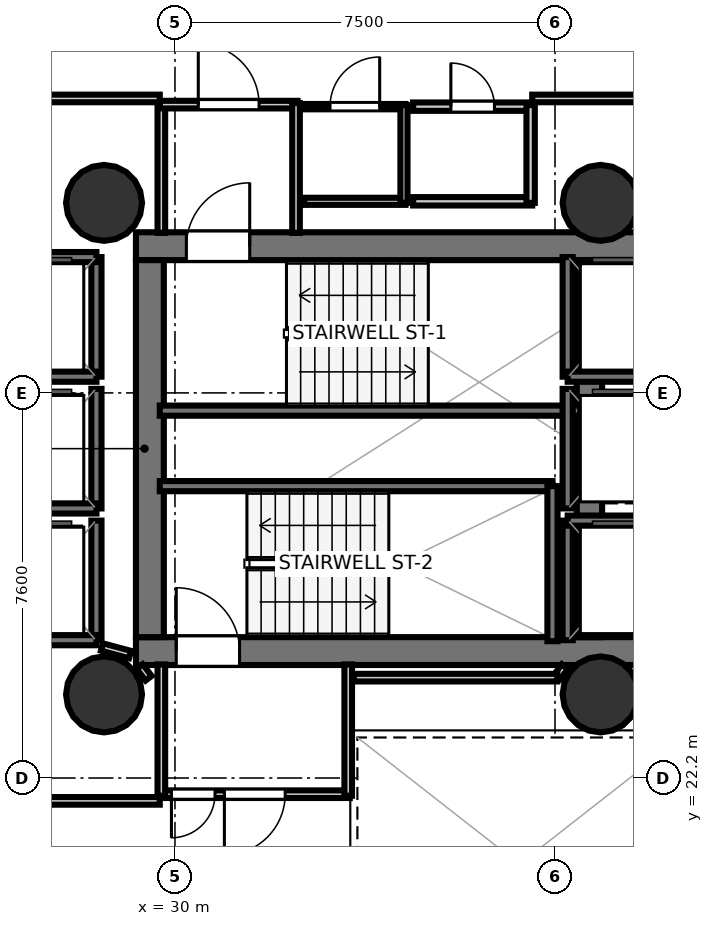
"""IFC4 building model, lengths in metres.
Left out: names, types, materials, properties, quantities, classifications, styles, units other than length and angle.
Written with IfcOpenShell. Run it as: python <this file> out.ifc"""

import sys

from ifc_helpers import new_model, si_unit, direction, frame, frame_2d, origin, origin_2d, place, context, subcontext, project, spatial, rectangle, hollow_circle, extrude, element, fill, save


model = new_model("IFC4")
c1 = context("Model", 3, precision=1e-05, world=origin(), true_north=direction((0.0, 1.0)))
c2 = subcontext(c1, "Body", "Model", "MODEL_VIEW")
j1 = project(units=[si_unit("LENGTHUNIT", "METRE"), si_unit("PLANEANGLEUNIT", "RADIAN")], contexts=[c1])
p1 = place(None, origin())
s1 = spatial("IfcSite", under=j1, at=p1, CompositionType="ELEMENT")
p2 = place(p1, origin())
s2 = spatial("IfcBuilding", under=s1, at=p2, CompositionType="ELEMENT")
p3 = place(p2, frame((0.0, 0.0, 116.3)))
s3 = spatial("IfcBuildingStorey", under=s2, at=p3, CompositionType="ELEMENT", Elevation=116.3)
p4 = place(p3, frame((29.23, 32.695, 0.0), z_axis=(0.0, 0.0, 1.0), x_axis=(1.0, 0.0, 0.0)))
e1 = element("IfcWall", 1, at=p4, inside=s3, PredefinedType="SHEAR", context=c2, shape_type="SweptSolid", body=[
    extrude(rectangle(XDim=10.62, YDim=0.55, at=frame_2d((5.31, 0.0))), origin(), (0.0, 0.0, 1.0), 3.52),
])
p5 = place(p4, frame((0.995, 0.0, 0.0)))
e2 = element("IfcOpeningElement", 2, at=p5, cuts=e1, PredefinedType="OPENING", context=c2, shape_type="SweptSolid", body=[
    extrude(rectangle(XDim=1.25, YDim=2.15, at=frame_2d((0.625, 1.075))), frame((0.0, 0.285, 0.0), z_axis=(0.0, -1.0, 0.0), x_axis=(1.0, 0.0, 0.0)), (0.0, 0.0, 1.0), 0.57),
])
p6 = place(p3, frame((29.23, 24.705, 0.0), z_axis=(0.0, 0.0, 1.0), x_axis=(1.0, 0.0, 0.0)))
e3 = element("IfcWall", 3, at=p6, inside=s3, PredefinedType="SHEAR", context=c2, shape_type="SweptSolid", body=[
    extrude(rectangle(XDim=10.62, YDim=0.55, at=frame_2d((5.31, 0.0))), origin(), (0.0, 0.0, 1.0), 3.52),
])
p7 = place(p6, frame((0.795, 0.0, 0.0)))
e4 = element("IfcOpeningElement", 4, at=p7, cuts=e3, PredefinedType="OPENING", context=c2, shape_type="SweptSolid", body=[
    extrude(rectangle(XDim=1.25, YDim=2.15, at=frame_2d((0.625, 1.075))), frame((0.0, 0.285, 0.0), z_axis=(0.0, -1.0, 0.0), x_axis=(1.0, 0.0, 0.0)), (0.0, 0.0, 1.0), 0.57),
])
p8 = place(p3, frame((29.505, 24.98, 0.0), z_axis=(0.0, 0.0, 1.0), x_axis=(0.0, 1.0, 0.0)))
e5 = element("IfcWall", 5, at=p8, inside=s3, PredefinedType="SHEAR", context=c2, shape_type="SweptSolid", body=[
    extrude(rectangle(XDim=7.44, YDim=0.55, at=frame_2d((3.72, 0.0))), origin(), (0.0, 0.0, 1.0), 3.52),
])
p9 = place(p3, frame((38.18, 24.98, 0.0), z_axis=(0.0, 0.0, 1.0), x_axis=(0.0, 1.0, 0.0)))
e6 = element("IfcWall", 6, at=p9, inside=s3, PredefinedType="SHEAR", context=c2, shape_type="SweptSolid", body=[
    extrude(rectangle(XDim=7.44, YDim=0.5, at=frame_2d((3.72, 0.0))), origin(), (0.0, 0.0, 1.0), 3.52),
])
for number, where, z_axis, x_axis in (
    (7, (28.6, 33.55, 0.0), (0.0, 0.0, 1.0), (1.0, 0.0, 0.0)),
    (8, (28.6, 23.85, 0.0), (0.0, 0.0, 1.0), (1.0, 0.0, 0.0)),
    (9, (38.4, 33.55, 0.0), (0.0, 0.0, 1.0), (1.0, 0.0, 0.0)),
    (10, (38.4, 23.85, 0.0), (0.0, 0.0, 1.0), (1.0, 0.0, 0.0)),
):
    element("IfcColumn", number, at=place(p3, frame(where, z_axis=z_axis, x_axis=x_axis)), inside=s3, PredefinedType="COLUMN", context=c2, shape_type="SweptSolid", body=[
        extrude(hollow_circle(Radius=0.75, WallThickness=0.036, at=origin_2d()), origin(), (0.0, 0.0, 1.0), 3.7),
    ])
p10 = place(p3, frame((29.7, 29.45, 0.0), z_axis=(0.0, 0.0, 1.0), x_axis=(1.0, 0.0, 0.0)))
e11 = element("IfcWall", 11, at=p10, inside=s3, PredefinedType="SOLIDWALL", context=c2, shape_type="SweptSolid", body=[
    extrude(rectangle(XDim=8.3, YDim=0.2, at=frame_2d((4.15, 0.0))), origin(), (0.0, 0.0, 1.0), 3.52),
])
p11 = place(p3, frame((29.7, 27.96, 0.0), z_axis=(0.0, 0.0, 1.0), x_axis=(1.0, 0.0, 0.0)))
e12 = element("IfcWall", 12, at=p11, inside=s3, PredefinedType="SOLIDWALL", context=c2, shape_type="SweptSolid", body=[
    extrude(rectangle(XDim=7.75, YDim=0.2, at=frame_2d((3.875, 0.0))), origin(), (0.0, 0.0, 1.0), 3.52),
])
p12 = place(p3, frame((37.45, 24.9, 0.0), z_axis=(0.0, 0.0, 1.0), x_axis=(0.0, 1.0, 0.0)))
e13 = element("IfcWall", 13, at=p12, inside=s3, PredefinedType="SOLIDWALL", context=c2, shape_type="SweptSolid", body=[
    extrude(rectangle(XDim=3.06, YDim=0.2, at=frame_2d((1.53, 0.0))), origin(), (0.0, 0.0, 1.0), 3.52),
])
p13 = place(p3, frame((37.75, 30.12, 0.0), z_axis=(0.0, 0.0, 1.0), x_axis=(0.0, 1.0, 0.0)))
e14 = element("IfcWall", 14, at=p13, inside=s3, PredefinedType="SOLIDWALL", context=c2, shape_type="SweptSolid", body=[
    extrude(rectangle(XDim=2.36, YDim=0.2, at=frame_2d((1.18, 0.0))), origin(), (0.0, 0.0, 1.0), 3.52),
])
p14 = place(p3, frame((37.75, 30.12, 0.0), z_axis=(0.0, 0.0, 1.0), x_axis=(1.0, 0.0, 0.0)))
e15 = element("IfcWall", 15, at=p14, inside=s3, PredefinedType="SOLIDWALL", context=c2, shape_type="SweptSolid", body=[
    extrude(rectangle(XDim=2.1, YDim=0.2, at=frame_2d((1.05, 0.0))), origin(), (0.0, 0.0, 1.0), 3.52),
])
p15 = place(p3, frame((37.75, 24.92, 0.0), z_axis=(0.0, 0.0, 1.0), x_axis=(0.0, 1.0, 0.0)))
e16 = element("IfcWall", 16, at=p15, inside=s3, PredefinedType="SOLIDWALL", context=c2, shape_type="SweptSolid", body=[
    extrude(rectangle(XDim=2.36, YDim=0.2, at=frame_2d((1.18, 0.0))), origin(), (0.0, 0.0, 1.0), 3.52),
])
p16 = place(p3, frame((37.75, 27.28, 0.0), z_axis=(0.0, 0.0, 1.0), x_axis=(1.0, 0.0, 0.0)))
e17 = element("IfcWall", 17, at=p16, inside=s3, PredefinedType="SOLIDWALL", context=c2, shape_type="SweptSolid", body=[
    extrude(rectangle(XDim=2.1, YDim=0.2, at=frame_2d((1.05, 0.0))), origin(), (0.0, 0.0, 1.0), 3.52),
])
p17 = place(p3, frame((28.45, 30.12, 0.0), z_axis=(0.0, 0.0, 1.0), x_axis=(0.0, 1.0, 0.0)))
e18 = element("IfcWall", 18, at=p17, inside=s3, PredefinedType="SOLIDWALL", context=c2, shape_type="SweptSolid", body=[
    extrude(rectangle(XDim=2.36, YDim=0.2, at=frame_2d((1.18, 0.0))), origin(), (0.0, 0.0, 1.0), 3.52),
])
for number, where, z_axis, x_axis in (
    (19, (26.35, 32.48, 0.0), (0.0, 0.0, 1.0), (1.0, 0.0, 0.0)),
    (20, (26.35, 30.12, 0.0), (0.0, 0.0, 1.0), (1.0, 0.0, 0.0)),
):
    element("IfcWall", number, at=place(p3, frame(where, z_axis=z_axis, x_axis=x_axis)), inside=s3, PredefinedType="SOLIDWALL", context=c2, shape_type="SweptSolid", body=[
        extrude(rectangle(XDim=2.1, YDim=0.2, at=frame_2d((1.05, 0.0))), origin(), (0.0, 0.0, 1.0), 3.52),
    ])
p18 = place(p3, frame((28.45, 27.52, 0.0), z_axis=(0.0, 0.0, 1.0), x_axis=(0.0, 1.0, 0.0)))
e21 = element("IfcWall", 21, at=p18, inside=s3, PredefinedType="SOLIDWALL", context=c2, shape_type="SweptSolid", body=[
    extrude(rectangle(XDim=2.36, YDim=0.2, at=frame_2d((1.18, 0.0))), origin(), (0.0, 0.0, 1.0), 3.52),
])
p19 = place(p3, frame((26.35, 27.52, 0.0), z_axis=(0.0, 0.0, 1.0), x_axis=(1.0, 0.0, 0.0)))
e22 = element("IfcWall", 22, at=p19, inside=s3, PredefinedType="SOLIDWALL", context=c2, shape_type="SweptSolid", body=[
    extrude(rectangle(XDim=2.1, YDim=0.2, at=frame_2d((1.05, 0.0))), origin(), (0.0, 0.0, 1.0), 3.52),
])
p20 = place(p3, frame((28.45, 24.92, 0.0), z_axis=(0.0, 0.0, 1.0), x_axis=(0.0, 1.0, 0.0)))
e23 = element("IfcWall", 23, at=p20, inside=s3, PredefinedType="SOLIDWALL", context=c2, shape_type="SweptSolid", body=[
    extrude(rectangle(XDim=2.36, YDim=0.2, at=frame_2d((1.18, 0.0))), origin(), (0.0, 0.0, 1.0), 3.52),
])
p21 = place(p3, frame((26.35, 24.92, 0.0), z_axis=(0.0, 0.0, 1.0), x_axis=(1.0, 0.0, 0.0)))
e24 = element("IfcWall", 24, at=p21, inside=s3, PredefinedType="SOLIDWALL", context=c2, shape_type="SweptSolid", body=[
    extrude(rectangle(XDim=2.1, YDim=0.2, at=frame_2d((1.05, 0.0))), origin(), (0.0, 0.0, 1.0), 3.52),
])
p22 = place(p3, frame((37.75, 27.52, 0.0), z_axis=(0.0, 0.0, 1.0), x_axis=(0.0, 1.0, 0.0)))
e25 = element("IfcWall", 25, at=p22, inside=s3, PredefinedType="SOLIDWALL", context=c2, shape_type="SweptSolid", body=[
    extrude(rectangle(XDim=2.36, YDim=0.2, at=frame_2d((1.18, 0.0))), origin(), (0.0, 0.0, 1.0), 3.52),
])
p23 = place(p3, frame((29.731, 32.958, 0.0), z_axis=(0.0, 0.0, 1.0), x_axis=(0.0, 1.0, 0.0)))
e26 = element("IfcWall", 26, at=p23, inside=s3, PredefinedType="PARTITIONING", context=c2, shape_type="SweptSolid", body=[
    extrude(rectangle(XDim=2.562, YDim=0.15, at=frame_2d((1.281, 0.0))), origin(), (0.0, 0.0, 1.0), 2.84),
])
p24 = place(p3, frame((29.7, 35.489, 0.0), z_axis=(0.0, 0.0, 1.0), x_axis=(1.0, 0.0, 0.0)))
e27 = element("IfcWall", 27, at=p24, inside=s3, PredefinedType="PARTITIONING", context=c2, shape_type="SweptSolid", body=[
    extrude(rectangle(XDim=2.72, YDim=0.15, at=frame_2d((1.36, 0.0))), origin(), (0.0, 0.0, 1.0), 2.84),
])
p25 = place(p24, frame((0.76, 0.0, 0.0)))
e28 = element("IfcOpeningElement", 28, at=p25, cuts=e27, PredefinedType="OPENING", context=c2, shape_type="SweptSolid", body=[
    extrude(rectangle(XDim=1.2, YDim=2.15, at=frame_2d((0.6, 1.075))), frame((0.0, 0.085, 0.0), z_axis=(0.0, -1.0, 0.0), x_axis=(1.0, 0.0, 0.0)), (0.0, 0.0, 1.0), 0.17),
])
p26 = place(p3, frame((32.389, 35.52, 0.0), z_axis=(0.0, 0.0, 1.0), x_axis=(0.0, -1.0, 0.0)))
e29 = element("IfcWall", 29, at=p26, inside=s3, PredefinedType="PARTITIONING", context=c2, shape_type="SweptSolid", body=[
    extrude(rectangle(XDim=2.562, YDim=0.15, at=frame_2d((1.281, 0.0))), origin(), (0.0, 0.0, 1.0), 2.84),
])
p27 = place(p3, frame((33.45, 21.881, 0.0), z_axis=(0.0, 0.0, 1.0), x_axis=(-1.0, 0.0, 0.0)))
e30 = element("IfcWall", 30, at=p27, inside=s3, PredefinedType="PARTITIONING", context=c2, shape_type="SweptSolid", body=[
    extrude(rectangle(XDim=3.75, YDim=0.15, at=frame_2d((1.875, 0.0))), origin(), (0.0, 0.0, 1.0), 2.84),
])
p28 = place(p27, frame((1.275, 0.0, 0.0)))
e31 = element("IfcOpeningElement", 31, at=p28, cuts=e30, PredefinedType="OPENING", context=c2, shape_type="SweptSolid", body=[
    extrude(rectangle(XDim=1.2, YDim=2.15, at=frame_2d((0.6, 1.075))), frame((0.0, 0.085, 0.0), z_axis=(0.0, -1.0, 0.0), x_axis=(1.0, 0.0, 0.0)), (0.0, 0.0, 1.0), 0.17),
])
p29 = place(p27, frame((2.66, 0.0, 0.0)))
e32 = element("IfcOpeningElement", 32, at=p29, cuts=e30, PredefinedType="OPENING", context=c2, shape_type="SweptSolid", body=[
    extrude(rectangle(XDim=0.86, YDim=2.05, at=frame_2d((0.43, 1.025))), frame((0.0, 0.085, 0.0), z_axis=(0.0, -1.0, 0.0), x_axis=(1.0, 0.0, 0.0)), (0.0, 0.0, 1.0), 0.17),
])
for number, where, z_axis, x_axis in (
    (33, (29.731, 21.85, 0.0), (0.0, 0.0, 1.0), (0.0, 1.0, 0.0)),
    (34, (33.419, 24.442, 0.0), (0.0, 0.0, 1.0), (0.0, -1.0, 0.0)),
):
    element("IfcWall", number, at=place(p3, frame(where, z_axis=z_axis, x_axis=x_axis)), inside=s3, PredefinedType="PARTITIONING", context=c2, shape_type="SweptSolid", body=[
        extrude(rectangle(XDim=2.592, YDim=0.15, at=frame_2d((1.296, 0.0))), origin(), (0.0, 0.0, 1.0), 2.84),
    ])
p30 = place(p3, frame((34.55, 33.581, 0.0), z_axis=(0.0, 0.0, 1.0), x_axis=(-1.0, 0.0, 0.0)))
e35 = element("IfcWall", 35, at=p30, inside=s3, PredefinedType="PARTITIONING", context=c2, shape_type="SweptSolid", body=[
    extrude(rectangle(XDim=2.0, YDim=0.14, at=frame_2d((1.0, 0.0))), origin(), (0.0, 0.0, 1.0), 2.84),
])
p31 = place(p3, frame((32.55, 35.449, 0.0), z_axis=(0.0, 0.0, 1.0), x_axis=(1.0, 0.0, 0.0)))
e36 = element("IfcWall", 36, at=p31, inside=s3, PredefinedType="PARTITIONING", context=c2, shape_type="SweptSolid", body=[
    extrude(rectangle(XDim=2.0, YDim=0.105, at=frame_2d((1.0, 0.0))), origin(), (0.0, 0.0, 1.0), 2.84),
])
p32 = place(p31, frame((0.51, 0.0, 0.0)))
e37 = element("IfcOpeningElement", 37, at=p32, cuts=e36, PredefinedType="OPENING", context=c2, shape_type="SweptSolid", body=[
    extrude(rectangle(XDim=0.98, YDim=2.1, at=frame_2d((0.49, 1.05))), frame((0.0, 0.062, 0.0), z_axis=(0.0, -1.0, 0.0), x_axis=(1.0, 0.0, 0.0)), (0.0, 0.0, 1.0), 0.125),
])
p33 = place(p3, frame((34.519, 35.48, 0.0), z_axis=(0.0, 0.0, 1.0), x_axis=(0.0, -1.0, 0.0)))
e38 = element("IfcWall", 38, at=p33, inside=s3, PredefinedType="PARTITIONING", context=c2, shape_type="SweptSolid", body=[
    extrude(rectangle(XDim=1.93, YDim=0.14, at=frame_2d((0.965, 0.0))), origin(), (0.0, 0.0, 1.0), 2.84),
])
p34 = place(p3, frame((37.05, 33.581, 0.0), z_axis=(0.0, 0.0, 1.0), x_axis=(-1.0, 0.0, 0.0)))
e39 = element("IfcWall", 39, at=p34, inside=s3, PredefinedType="PLUMBINGWALL", context=c2, shape_type="SweptSolid", body=[
    extrude(rectangle(XDim=2.35, YDim=0.165, at=frame_2d((1.175, 0.0))), origin(), (0.0, 0.0, 1.0), 2.84),
])
p35 = place(p3, frame((34.7, 35.449, 0.0), z_axis=(0.0, 0.0, 1.0), x_axis=(1.0, 0.0, 0.0)))
e40 = element("IfcWall", 40, at=p35, inside=s3, PredefinedType="PLUMBINGWALL", context=c2, shape_type="SweptSolid", body=[
    extrude(rectangle(XDim=2.35, YDim=0.165, at=frame_2d((1.175, 0.0))), origin(), (0.0, 0.0, 1.0), 2.84),
])
p36 = place(p35, frame((0.745, 0.0, 0.0)))
e41 = element("IfcOpeningElement", 41, at=p36, cuts=e40, PredefinedType="OPENING", context=c2, shape_type="SweptSolid", body=[
    extrude(rectangle(XDim=0.86, YDim=2.05, at=frame_2d((0.43, 1.025))), frame((0.0, 0.093, 0.0), z_axis=(0.0, -1.0, 0.0), x_axis=(1.0, 0.0, 0.0)), (0.0, 0.0, 1.0), 0.185),
])
p37 = place(p3, frame((37.019, 35.48, 0.0), z_axis=(0.0, 0.0, 1.0), x_axis=(0.0, -1.0, 0.0)))
e42 = element("IfcWall", 42, at=p37, inside=s3, PredefinedType="PLUMBINGWALL", context=c2, shape_type="SweptSolid", body=[
    extrude(rectangle(XDim=1.93, YDim=0.165, at=frame_2d((0.965, 0.0))), origin(), (0.0, 0.0, 1.0), 2.84),
])
p38 = place(p3, frame((29.48, 24.169, 0.0), z_axis=(0.0, 0.0, 1.0), x_axis=(-0.608043045279, 0.79390405912, 0.0)))
e43 = element("IfcWall", 43, at=p38, inside=s3, PredefinedType="PARTITIONING", context=c2, shape_type="SweptSolid", body=[
    extrude(rectangle(XDim=0.29, YDim=0.15, at=frame_2d((0.145, 0.0))), origin(), (0.0, 0.0, 1.0), 2.84),
])
p39 = place(p3, frame((29.114, 24.637, 0.0), z_axis=(0.0, 0.0, 1.0), x_axis=(-0.966199685486, 0.257794817183, 0.0)))
e44 = element("IfcWall", 44, at=p39, inside=s3, PredefinedType="PARTITIONING", context=c2, shape_type="SweptSolid", body=[
    extrude(rectangle(XDim=0.575, YDim=0.15, at=frame_2d((0.288, 0.0))), origin(), (0.0, 0.0, 1.0), 2.84),
])
p40 = place(p3, frame((37.697, 24.399, 0.0), z_axis=(0.0, 0.0, 1.0), x_axis=(-0.60763139403, -0.794219169367, 0.0)))
e45 = element("IfcWall", 45, at=p40, inside=s3, PredefinedType="PARTITIONING", context=c2, shape_type="SweptSolid", body=[
    extrude(rectangle(XDim=0.25, YDim=0.15, at=frame_2d((0.125, 0.0))), origin(), (0.0, 0.0, 1.0), 2.84),
])
p41 = place(p3, frame((37.545, 24.181, 0.0), z_axis=(0.0, 0.0, 1.0), x_axis=(-1.0, 0.0, 0.0)))
e46 = element("IfcWall", 46, at=p41, inside=s3, PredefinedType="PARTITIONING", context=c2, shape_type="SweptSolid", body=[
    extrude(rectangle(XDim=4.015, YDim=0.15, at=frame_2d((2.007, 0.0))), origin(), (0.0, 0.0, 1.0), 2.84),
])
p42 = place(p3, frame((39.818, 35.611, 0.0), z_axis=(0.0, 0.0, 1.0), x_axis=(-1.0, 0.0, 0.0)))
e47 = element("IfcWall", 47, at=p42, inside=s3, PredefinedType="PARTITIONING", context=c2, shape_type="SweptSolid", body=[
    extrude(rectangle(XDim=2.768, YDim=0.15, at=frame_2d((1.384, 0.0))), origin(), (0.0, 0.0, 1.0), 2.84),
])
for number, where, z_axis, x_axis in (
    (48, (29.7, 35.611, 0.0), (0.0, 0.0, 1.0), (-1.0, 0.0, 0.0)),
    (49, (26.42, 21.749, 0.0), (0.0, 0.0, 1.0), (1.0, 0.0, 0.0)),
):
    element("IfcWall", number, at=place(p3, frame(where, z_axis=z_axis, x_axis=x_axis)), inside=s3, PredefinedType="PARTITIONING", context=c2, shape_type="SweptSolid", body=[
        extrude(rectangle(XDim=3.28, YDim=0.15, at=frame_2d((1.64, 0.0))), origin(), (0.0, 0.0, 1.0), 2.84),
    ])
p43 = place(p5, origin())
e50 = element("IfcDoor", 50, at=p43, inside=s3, OperationType="SINGLE_SWING_RIGHT", PredefinedType="DOOR", context=c2, shape_type="SweptSolid", body=[
    extrude(rectangle(XDim=1.25, YDim=2.15, at=frame_2d((0.625, 1.075))), frame((0.0, 0.025, 0.0), z_axis=(0.0, -1.0, 0.0), x_axis=(1.0, 0.0, 0.0)), (0.0, 0.0, 1.0), 0.05),
])
fill(e2, e50)
p44 = place(p7, origin())
e51 = element("IfcDoor", 51, at=p44, inside=s3, OperationType="SINGLE_SWING_LEFT", PredefinedType="DOOR", context=c2, shape_type="SweptSolid", body=[
    extrude(rectangle(XDim=1.25, YDim=2.15, at=frame_2d((0.625, 1.075))), frame((0.0, 0.025, 0.0), z_axis=(0.0, -1.0, 0.0), x_axis=(1.0, 0.0, 0.0)), (0.0, 0.0, 1.0), 0.05),
])
fill(e4, e51)
p45 = place(p25, origin())
e52 = element("IfcDoor", 52, at=p45, inside=s3, OperationType="SINGLE_SWING_LEFT", PredefinedType="DOOR", context=c2, shape_type="SweptSolid", body=[
    extrude(rectangle(XDim=1.2, YDim=2.15, at=frame_2d((0.6, 1.075))), frame((0.0, 0.025, 0.0), z_axis=(0.0, -1.0, 0.0), x_axis=(1.0, 0.0, 0.0)), (0.0, 0.0, 1.0), 0.05),
])
fill(e28, e52)
p46 = place(p28, origin())
e53 = element("IfcDoor", 53, at=p46, inside=s3, OperationType="SINGLE_SWING_RIGHT", PredefinedType="DOOR", context=c2, shape_type="SweptSolid", body=[
    extrude(rectangle(XDim=1.2, YDim=2.15, at=frame_2d((0.6, 1.075))), frame((0.0, 0.025, 0.0), z_axis=(0.0, -1.0, 0.0), x_axis=(1.0, 0.0, 0.0)), (0.0, 0.0, 1.0), 0.05),
])
fill(e31, e53)
p47 = place(p32, origin())
e54 = element("IfcDoor", 54, at=p47, inside=s3, OperationType="SINGLE_SWING_RIGHT", PredefinedType="DOOR", context=c2, shape_type="SweptSolid", body=[
    extrude(rectangle(XDim=0.98, YDim=2.1, at=frame_2d((0.49, 1.05))), frame((0.0, 0.025, 0.0), z_axis=(0.0, -1.0, 0.0), x_axis=(1.0, 0.0, 0.0)), (0.0, 0.0, 1.0), 0.05),
])
fill(e37, e54)
p48 = place(p36, origin())
e55 = element("IfcDoor", 55, at=p48, inside=s3, OperationType="SINGLE_SWING_LEFT", PredefinedType="DOOR", context=c2, shape_type="SweptSolid", body=[
    extrude(rectangle(XDim=0.86, YDim=2.05, at=frame_2d((0.43, 1.025))), frame((0.0, 0.025, 0.0), z_axis=(0.0, -1.0, 0.0), x_axis=(1.0, 0.0, 0.0)), (0.0, 0.0, 1.0), 0.05),
])
fill(e41, e55)
p49 = place(p29, origin())
e56 = element("IfcDoor", 56, at=p49, inside=s3, OperationType="SINGLE_SWING_RIGHT", PredefinedType="DOOR", context=c2, shape_type="SweptSolid", body=[
    extrude(rectangle(XDim=0.86, YDim=2.05, at=frame_2d((0.43, 1.025))), frame((0.0, 0.025, 0.0), z_axis=(0.0, -1.0, 0.0), x_axis=(1.0, 0.0, 0.0)), (0.0, 0.0, 1.0), 0.05),
])
fill(e32, e56)
save(model, sys.argv[1])
